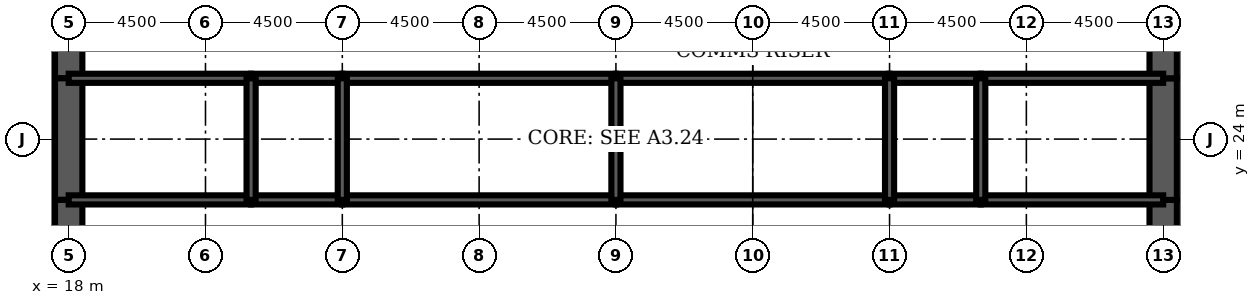
"""IFC4 building model, lengths in metres.
Left out: names, types, materials, properties, quantities, classifications, styles, units other than length and angle.
Written with IfcOpenShell. Run it as: python <this file> out.ifc"""

import sys

from ifc_helpers import new_model, si_unit, direction, frame, frame_2d, origin, place, context, subcontext, project, spatial, rectangle, extrude, element, fill, save


model = new_model("IFC4")
c1 = context("Model", 3, precision=1e-05, world=origin(), true_north=direction((0.0, 1.0)))
c2 = subcontext(c1, "Body", "Model", "MODEL_VIEW")
j1 = project(units=[si_unit("LENGTHUNIT", "METRE"), si_unit("PLANEANGLEUNIT", "RADIAN")], contexts=[c1])
p1 = place(None, origin())
s1 = spatial("IfcSite", under=j1, at=p1, CompositionType="ELEMENT")
p2 = place(p1, origin())
s2 = spatial("IfcBuilding", under=s1, at=p2, CompositionType="ELEMENT")
p3 = place(p2, frame((0.0, 0.0, 104.7)))
s3 = spatial("IfcBuildingStorey", under=s2, at=p3, CompositionType="ELEMENT", Elevation=104.7)
p4 = place(p3, frame((18.0, 28.8, 0.0), z_axis=(0.0, 0.0, 1.0), x_axis=(0.0, -1.0, 0.0)))
e1 = element("IfcWall", 1, at=p4, inside=s3, PredefinedType="SHEAR", context=c2, shape_type="SweptSolid", body=[
    extrude(rectangle(XDim=2.8, YDim=0.9, at=frame_2d((1.4, 0.0))), origin(), (0.0, 0.0, 1.0), 4.2),
])
p5 = place(p4, frame((0.4, 0.0, 0.0)))
e2 = element("IfcOpeningElement", 2, at=p5, cuts=e1, PredefinedType="OPENING", context=c2, shape_type="SweptSolid", body=[
    extrude(rectangle(XDim=1.8, YDim=2.1, at=frame_2d((0.9, 1.05))), frame((0.0, 0.46, 0.0), z_axis=(0.0, -1.0, 0.0), x_axis=(1.0, 0.0, 0.0)), (0.0, 0.0, 1.0), 0.92),
])
p6 = place(p3, frame((18.0, 26.0, 0.0), z_axis=(0.0, 0.0, 1.0), x_axis=(0.0, -1.0, 0.0)))
e3 = element("IfcWall", 3, at=p6, inside=s3, PredefinedType="SHEAR", context=c2, shape_type="SweptSolid", body=[
    extrude(rectangle(XDim=4.0, YDim=0.9, at=frame_2d((2.0, 0.0))), origin(), (0.0, 0.0, 1.0), 4.2),
])
p7 = place(p3, frame((18.0, 22.0, 0.0), z_axis=(0.0, 0.0, 1.0), x_axis=(0.0, -1.0, 0.0)))
e4 = element("IfcWall", 4, at=p7, inside=s3, PredefinedType="SHEAR", context=c2, shape_type="SweptSolid", body=[
    extrude(rectangle(XDim=2.8, YDim=0.9, at=frame_2d((1.4, 0.0))), origin(), (0.0, 0.0, 1.0), 4.2),
])
p8 = place(p7, frame((0.6, 0.0, 0.0)))
e5 = element("IfcOpeningElement", 5, at=p8, cuts=e4, PredefinedType="OPENING", context=c2, shape_type="SweptSolid", body=[
    extrude(rectangle(XDim=1.8, YDim=2.1, at=frame_2d((0.9, 1.05))), frame((0.0, 0.46, 0.0), z_axis=(0.0, -1.0, 0.0), x_axis=(1.0, 0.0, 0.0)), (0.0, 0.0, 1.0), 0.92),
])
p9 = place(p3, frame((54.0, 19.2, 0.0), z_axis=(0.0, 0.0, 1.0), x_axis=(0.0, 1.0, 0.0)))
e6 = element("IfcWall", 6, at=p9, inside=s3, PredefinedType="SHEAR", context=c2, shape_type="SweptSolid", body=[
    extrude(rectangle(XDim=2.8, YDim=0.9, at=frame_2d((1.4, 0.0))), origin(), (0.0, 0.0, 1.0), 4.2),
])
p10 = place(p9, frame((0.4, 0.0, 0.0)))
e7 = element("IfcOpeningElement", 7, at=p10, cuts=e6, PredefinedType="OPENING", context=c2, shape_type="SweptSolid", body=[
    extrude(rectangle(XDim=1.8, YDim=2.1, at=frame_2d((0.9, 1.05))), frame((0.0, 0.46, 0.0), z_axis=(0.0, -1.0, 0.0), x_axis=(1.0, 0.0, 0.0)), (0.0, 0.0, 1.0), 0.92),
])
p11 = place(p3, frame((54.0, 22.0, 0.0), z_axis=(0.0, 0.0, 1.0), x_axis=(0.0, 1.0, 0.0)))
e8 = element("IfcWall", 8, at=p11, inside=s3, PredefinedType="SHEAR", context=c2, shape_type="SweptSolid", body=[
    extrude(rectangle(XDim=4.0, YDim=0.9, at=frame_2d((2.0, 0.0))), origin(), (0.0, 0.0, 1.0), 4.2),
])
p12 = place(p3, frame((54.0, 26.0, 0.0), z_axis=(0.0, 0.0, 1.0), x_axis=(0.0, 1.0, 0.0)))
e9 = element("IfcWall", 9, at=p12, inside=s3, PredefinedType="SHEAR", context=c2, shape_type="SweptSolid", body=[
    extrude(rectangle(XDim=2.8, YDim=0.9, at=frame_2d((1.4, 0.0))), origin(), (0.0, 0.0, 1.0), 4.2),
])
p13 = place(p12, frame((0.6, 0.0, 0.0)))
e10 = element("IfcOpeningElement", 10, at=p13, cuts=e9, PredefinedType="OPENING", context=c2, shape_type="SweptSolid", body=[
    extrude(rectangle(XDim=1.8, YDim=2.1, at=frame_2d((0.9, 1.05))), frame((0.0, 0.46, 0.0), z_axis=(0.0, -1.0, 0.0), x_axis=(1.0, 0.0, 0.0)), (0.0, 0.0, 1.0), 0.92),
])
p14 = place(p3, frame((18.0, 22.0, 0.0), z_axis=(0.0, 0.0, 1.0), x_axis=(1.0, 0.0, 0.0)))
e11 = element("IfcWall", 11, at=p14, inside=s3, PredefinedType="SOLIDWALL", context=c2, shape_type="SweptSolid", body=[
    extrude(rectangle(XDim=6.0, YDim=0.3, at=frame_2d((3.0, 0.0))), origin(), (0.0, 0.0, 1.0), 4.2),
])
p15 = place(p14, frame((4.4, 0.0, 0.0)))
e12 = element("IfcOpeningElement", 12, at=p15, cuts=e11, PredefinedType="OPENING", context=c2, shape_type="SweptSolid", body=[
    extrude(rectangle(XDim=1.0, YDim=2.1, at=frame_2d((0.5, 1.05))), frame((0.0, 0.16, 0.0), z_axis=(0.0, -1.0, 0.0), x_axis=(1.0, 0.0, 0.0)), (0.0, 0.0, 1.0), 0.32),
])
p16 = place(p14, frame((0.7, 0.0, 0.0)))
e13 = element("IfcOpeningElement", 13, at=p16, cuts=e11, PredefinedType="OPENING", context=c2, shape_type="SweptSolid", body=[
    extrude(rectangle(XDim=1.0, YDim=2.1, at=frame_2d((0.5, 1.05))), frame((0.0, 0.16, 0.0), z_axis=(0.0, -1.0, 0.0), x_axis=(1.0, 0.0, 0.0)), (0.0, 0.0, 1.0), 0.32),
])
p17 = place(p3, frame((24.0, 22.0, 0.0), z_axis=(0.0, 0.0, 1.0), x_axis=(1.0, 0.0, 0.0)))
e14 = element("IfcWall", 14, at=p17, inside=s3, PredefinedType="SOLIDWALL", context=c2, shape_type="SweptSolid", body=[
    extrude(rectangle(XDim=3.0, YDim=0.3, at=frame_2d((1.5, 0.0))), origin(), (0.0, 0.0, 1.0), 4.2),
])
p18 = place(p17, frame((1.0, 0.0, 0.0)))
e15 = element("IfcOpeningElement", 15, at=p18, cuts=e14, PredefinedType="OPENING", context=c2, shape_type="SweptSolid", body=[
    extrude(rectangle(XDim=1.0, YDim=2.1, at=frame_2d((0.5, 1.05))), frame((0.0, 0.16, 0.0), z_axis=(0.0, -1.0, 0.0), x_axis=(1.0, 0.0, 0.0)), (0.0, 0.0, 1.0), 0.32),
])
p19 = place(p3, frame((27.0, 22.0, 0.0), z_axis=(0.0, 0.0, 1.0), x_axis=(1.0, 0.0, 0.0)))
e16 = element("IfcWall", 16, at=p19, inside=s3, PredefinedType="SOLIDWALL", context=c2, shape_type="SweptSolid", body=[
    extrude(rectangle(XDim=9.0, YDim=0.3, at=frame_2d((4.5, 0.0))), origin(), (0.0, 0.0, 1.0), 4.2),
])
p20 = place(p19, frame((4.0, 0.0, 0.0)))
e17 = element("IfcOpeningElement", 17, at=p20, cuts=e16, PredefinedType="OPENING", context=c2, shape_type="SweptSolid", body=[
    extrude(rectangle(XDim=1.0, YDim=2.1, at=frame_2d((0.5, 1.05))), frame((0.0, 0.16, 0.0), z_axis=(0.0, -1.0, 0.0), x_axis=(1.0, 0.0, 0.0)), (0.0, 0.0, 1.0), 0.32),
])
p21 = place(p3, frame((36.0, 22.0, 0.0), z_axis=(0.0, 0.0, 1.0), x_axis=(1.0, 0.0, 0.0)))
e18 = element("IfcWall", 18, at=p21, inside=s3, PredefinedType="SOLIDWALL", context=c2, shape_type="SweptSolid", body=[
    extrude(rectangle(XDim=9.0, YDim=0.3, at=frame_2d((4.5, 0.0))), origin(), (0.0, 0.0, 1.0), 4.2),
])
p22 = place(p21, frame((4.0, 0.0, 0.0)))
e19 = element("IfcOpeningElement", 19, at=p22, cuts=e18, PredefinedType="OPENING", context=c2, shape_type="SweptSolid", body=[
    extrude(rectangle(XDim=1.0, YDim=2.1, at=frame_2d((0.5, 1.05))), frame((0.0, 0.16, 0.0), z_axis=(0.0, -1.0, 0.0), x_axis=(1.0, 0.0, 0.0)), (0.0, 0.0, 1.0), 0.32),
])
p23 = place(p3, frame((45.0, 22.0, 0.0), z_axis=(0.0, 0.0, 1.0), x_axis=(1.0, 0.0, 0.0)))
e20 = element("IfcWall", 20, at=p23, inside=s3, PredefinedType="SOLIDWALL", context=c2, shape_type="SweptSolid", body=[
    extrude(rectangle(XDim=3.0, YDim=0.3, at=frame_2d((1.5, 0.0))), origin(), (0.0, 0.0, 1.0), 4.2),
])
p24 = place(p23, frame((1.0, 0.0, 0.0)))
e21 = element("IfcOpeningElement", 21, at=p24, cuts=e20, PredefinedType="OPENING", context=c2, shape_type="SweptSolid", body=[
    extrude(rectangle(XDim=1.0, YDim=2.1, at=frame_2d((0.5, 1.05))), frame((0.0, 0.16, 0.0), z_axis=(0.0, -1.0, 0.0), x_axis=(1.0, 0.0, 0.0)), (0.0, 0.0, 1.0), 0.32),
])
p25 = place(p3, frame((48.0, 22.0, 0.0), z_axis=(0.0, 0.0, 1.0), x_axis=(1.0, 0.0, 0.0)))
e22 = element("IfcWall", 22, at=p25, inside=s3, PredefinedType="SOLIDWALL", context=c2, shape_type="SweptSolid", body=[
    extrude(rectangle(XDim=6.0, YDim=0.3, at=frame_2d((3.0, 0.0))), origin(), (0.0, 0.0, 1.0), 4.2),
])
p26 = place(p25, frame((2.0, 0.0, 0.0)))
e23 = element("IfcOpeningElement", 23, at=p26, cuts=e22, PredefinedType="OPENING", context=c2, shape_type="SweptSolid", body=[
    extrude(rectangle(XDim=1.0, YDim=2.1, at=frame_2d((0.5, 1.05))), frame((0.0, 0.16, 0.0), z_axis=(0.0, -1.0, 0.0), x_axis=(1.0, 0.0, 0.0)), (0.0, 0.0, 1.0), 0.32),
])
p27 = place(p25, frame((4.3, 0.0, 0.0)))
e24 = element("IfcOpeningElement", 24, at=p27, cuts=e22, PredefinedType="OPENING", context=c2, shape_type="SweptSolid", body=[
    extrude(rectangle(XDim=1.0, YDim=2.1, at=frame_2d((0.5, 1.05))), frame((0.0, 0.16, 0.0), z_axis=(0.0, -1.0, 0.0), x_axis=(1.0, 0.0, 0.0)), (0.0, 0.0, 1.0), 0.32),
])
p28 = place(p3, frame((18.0, 26.0, 0.0), z_axis=(0.0, 0.0, 1.0), x_axis=(1.0, 0.0, 0.0)))
e25 = element("IfcWall", 25, at=p28, inside=s3, PredefinedType="SOLIDWALL", context=c2, shape_type="SweptSolid", body=[
    extrude(rectangle(XDim=6.0, YDim=0.3, at=frame_2d((3.0, 0.0))), origin(), (0.0, 0.0, 1.0), 4.2),
])
p29 = place(p3, frame((24.0, 26.0, 0.0), z_axis=(0.0, 0.0, 1.0), x_axis=(1.0, 0.0, 0.0)))
e26 = element("IfcWall", 26, at=p29, inside=s3, PredefinedType="SOLIDWALL", context=c2, shape_type="SweptSolid", body=[
    extrude(rectangle(XDim=3.0, YDim=0.3, at=frame_2d((1.5, 0.0))), origin(), (0.0, 0.0, 1.0), 4.2),
])
for number, where, z_axis, x_axis in (
    (27, (27.0, 26.0, 0.0), (0.0, 0.0, 1.0), (1.0, 0.0, 0.0)),
    (28, (36.0, 26.0, 0.0), (0.0, 0.0, 1.0), (1.0, 0.0, 0.0)),
):
    element("IfcWall", number, at=place(p3, frame(where, z_axis=z_axis, x_axis=x_axis)), inside=s3, PredefinedType="SOLIDWALL", context=c2, shape_type="SweptSolid", body=[
        extrude(rectangle(XDim=9.0, YDim=0.3, at=frame_2d((4.5, 0.0))), origin(), (0.0, 0.0, 1.0), 4.2),
    ])
p30 = place(p3, frame((45.0, 26.0, 0.0), z_axis=(0.0, 0.0, 1.0), x_axis=(1.0, 0.0, 0.0)))
e29 = element("IfcWall", 29, at=p30, inside=s3, PredefinedType="SOLIDWALL", context=c2, shape_type="SweptSolid", body=[
    extrude(rectangle(XDim=3.0, YDim=0.3, at=frame_2d((1.5, 0.0))), origin(), (0.0, 0.0, 1.0), 4.2),
])
p31 = place(p3, frame((48.0, 26.0, 0.0), z_axis=(0.0, 0.0, 1.0), x_axis=(1.0, 0.0, 0.0)))
e30 = element("IfcWall", 30, at=p31, inside=s3, PredefinedType="SOLIDWALL", context=c2, shape_type="SweptSolid", body=[
    extrude(rectangle(XDim=6.0, YDim=0.3, at=frame_2d((3.0, 0.0))), origin(), (0.0, 0.0, 1.0), 4.2),
])
for number, where, z_axis, x_axis in (
    (31, (24.0, 22.0, 0.0), (0.0, 0.0, 1.0), (0.0, 1.0, 0.0)),
    (32, (27.0, 22.0, 0.0), (0.0, 0.0, 1.0), (0.0, 1.0, 0.0)),
    (33, (36.0, 22.0, 0.0), (0.0, 0.0, 1.0), (0.0, 1.0, 0.0)),
    (34, (45.0, 22.0, 0.0), (0.0, 0.0, 1.0), (0.0, 1.0, 0.0)),
    (35, (48.0, 22.0, 0.0), (0.0, 0.0, 1.0), (0.0, 1.0, 0.0)),
):
    element("IfcWall", number, at=place(p3, frame(where, z_axis=z_axis, x_axis=x_axis)), inside=s3, PredefinedType="SOLIDWALL", context=c2, shape_type="SweptSolid", body=[
        extrude(rectangle(XDim=4.0, YDim=0.3, at=frame_2d((2.0, 0.0))), origin(), (0.0, 0.0, 1.0), 4.2),
    ])
p32 = place(p3, frame((38.0, 22.15, 0.0), z_axis=(0.0, 0.0, 1.0), x_axis=(0.0, 1.0, 0.0)))
e36 = element("IfcWall", 36, at=p32, inside=s3, PredefinedType="PARTITIONING", context=c2, shape_type="SweptSolid", body=[
    extrude(rectangle(XDim=3.7, YDim=0.15, at=frame_2d((1.85, 0.0))), origin(), (0.0, 0.0, 1.0), 3.0),
])
p33 = place(p32, frame((2.2, 0.0, 0.0)))
e37 = element("IfcOpeningElement", 37, at=p33, cuts=e36, PredefinedType="OPENING", context=c2, shape_type="SweptSolid", body=[
    extrude(rectangle(XDim=1.0, YDim=2.1, at=frame_2d((0.5, 1.05))), frame((0.0, 0.085, 0.0), z_axis=(0.0, -1.0, 0.0), x_axis=(1.0, 0.0, 0.0)), (0.0, 0.0, 1.0), 0.17),
])
for number, where, z_axis, x_axis in (
    (38, (20.025, 22.15, 0.0), (0.0, 0.0, 1.0), (0.0, 1.0, 0.0)),
    (39, (51.975, 22.15, 0.0), (0.0, 0.0, 1.0), (0.0, 1.0, 0.0)),
):
    element("IfcWall", number, at=place(p3, frame(where, z_axis=z_axis, x_axis=x_axis)), inside=s3, PredefinedType="PARTITIONING", context=c2, shape_type="SweptSolid", body=[
        extrude(rectangle(XDim=3.7, YDim=0.15, at=frame_2d((1.85, 0.0))), origin(), (0.0, 0.0, 1.0), 3.0),
    ])
p34 = place(p33, origin())
e40 = element("IfcDoor", 40, at=p34, inside=s3, OperationType="SINGLE_SWING_RIGHT", PredefinedType="DOOR", context=c2, shape_type="SweptSolid", body=[
    extrude(rectangle(XDim=1.0, YDim=2.1, at=frame_2d((0.5, 1.05))), frame((0.0, 0.025, 0.0), z_axis=(0.0, -1.0, 0.0), x_axis=(1.0, 0.0, 0.0)), (0.0, 0.0, 1.0), 0.05),
])
fill(e37, e40)
p35 = place(p8, origin())
e41 = element("IfcDoor", 41, at=p35, inside=s3, OperationType="SINGLE_SWING_LEFT", PredefinedType="DOOR", context=c2, shape_type="SweptSolid", body=[
    extrude(rectangle(XDim=1.8, YDim=2.1, at=frame_2d((0.9, 1.05))), frame((0.0, 0.45, 0.0), z_axis=(0.0, -1.0, 0.0), x_axis=(1.0, 0.0, 0.0)), (0.0, 0.0, 1.0), 0.899),
])
fill(e5, e41)
p36 = place(p5, origin())
e42 = element("IfcDoor", 42, at=p36, inside=s3, OperationType="SINGLE_SWING_LEFT", PredefinedType="DOOR", context=c2, shape_type="SweptSolid", body=[
    extrude(rectangle(XDim=1.8, YDim=2.1, at=frame_2d((0.9, 1.05))), frame((0.0, 0.45, 0.0), z_axis=(0.0, -1.0, 0.0), x_axis=(1.0, 0.0, 0.0)), (0.0, 0.0, 1.0), 0.899),
])
fill(e2, e42)
p37 = place(p10, origin())
e43 = element("IfcDoor", 43, at=p37, inside=s3, OperationType="SINGLE_SWING_LEFT", PredefinedType="DOOR", context=c2, shape_type="SweptSolid", body=[
    extrude(rectangle(XDim=1.8, YDim=2.1, at=frame_2d((0.9, 1.05))), frame((0.0, 0.45, 0.0), z_axis=(0.0, -1.0, 0.0), x_axis=(1.0, 0.0, 0.0)), (0.0, 0.0, 1.0), 0.899),
])
fill(e7, e43)
p38 = place(p13, origin())
e44 = element("IfcDoor", 44, at=p38, inside=s3, OperationType="SINGLE_SWING_LEFT", PredefinedType="DOOR", context=c2, shape_type="SweptSolid", body=[
    extrude(rectangle(XDim=1.8, YDim=2.1, at=frame_2d((0.9, 1.05))), frame((0.0, 0.45, 0.0), z_axis=(0.0, -1.0, 0.0), x_axis=(1.0, 0.0, 0.0)), (0.0, 0.0, 1.0), 0.899),
])
fill(e10, e44)
p39 = place(p15, origin())
e45 = element("IfcDoor", 45, at=p39, inside=s3, OperationType="SINGLE_SWING_RIGHT", PredefinedType="DOOR", context=c2, shape_type="SweptSolid", body=[
    extrude(rectangle(XDim=1.0, YDim=2.1, at=frame_2d((0.5, 1.05))), frame((0.0, 0.025, 0.0), z_axis=(0.0, -1.0, 0.0), x_axis=(1.0, 0.0, 0.0)), (0.0, 0.0, 1.0), 0.05),
])
fill(e12, e45)
p40 = place(p18, origin())
e46 = element("IfcDoor", 46, at=p40, inside=s3, OperationType="SINGLE_SWING_LEFT", PredefinedType="DOOR", context=c2, shape_type="SweptSolid", body=[
    extrude(rectangle(XDim=1.0, YDim=2.1, at=frame_2d((0.5, 1.05))), frame((0.0, 0.025, 0.0), z_axis=(0.0, -1.0, 0.0), x_axis=(1.0, 0.0, 0.0)), (0.0, 0.0, 1.0), 0.05),
])
fill(e15, e46)
p41 = place(p20, origin())
e47 = element("IfcDoor", 47, at=p41, inside=s3, OperationType="SINGLE_SWING_LEFT", PredefinedType="DOOR", context=c2, shape_type="SweptSolid", body=[
    extrude(rectangle(XDim=1.0, YDim=2.1, at=frame_2d((0.5, 1.05))), frame((0.0, 0.025, 0.0), z_axis=(0.0, -1.0, 0.0), x_axis=(1.0, 0.0, 0.0)), (0.0, 0.0, 1.0), 0.05),
])
fill(e17, e47)
p42 = place(p22, origin())
e48 = element("IfcDoor", 48, at=p42, inside=s3, OperationType="SINGLE_SWING_LEFT", PredefinedType="DOOR", context=c2, shape_type="SweptSolid", body=[
    extrude(rectangle(XDim=1.0, YDim=2.1, at=frame_2d((0.5, 1.05))), frame((0.0, 0.025, 0.0), z_axis=(0.0, -1.0, 0.0), x_axis=(1.0, 0.0, 0.0)), (0.0, 0.0, 1.0), 0.05),
])
fill(e19, e48)
p43 = place(p24, origin())
e49 = element("IfcDoor", 49, at=p43, inside=s3, OperationType="SINGLE_SWING_LEFT", PredefinedType="DOOR", context=c2, shape_type="SweptSolid", body=[
    extrude(rectangle(XDim=1.0, YDim=2.1, at=frame_2d((0.5, 1.05))), frame((0.0, 0.025, 0.0), z_axis=(0.0, -1.0, 0.0), x_axis=(1.0, 0.0, 0.0)), (0.0, 0.0, 1.0), 0.05),
])
fill(e21, e49)
p44 = place(p26, origin())
e50 = element("IfcDoor", 50, at=p44, inside=s3, OperationType="SINGLE_SWING_LEFT", PredefinedType="DOOR", context=c2, shape_type="SweptSolid", body=[
    extrude(rectangle(XDim=1.0, YDim=2.1, at=frame_2d((0.5, 1.05))), frame((0.0, 0.025, 0.0), z_axis=(0.0, -1.0, 0.0), x_axis=(1.0, 0.0, 0.0)), (0.0, 0.0, 1.0), 0.05),
])
fill(e23, e50)
p45 = place(p16, origin())
e51 = element("IfcDoor", 51, at=p45, inside=s3, OperationType="SINGLE_SWING_LEFT", PredefinedType="DOOR", context=c2, shape_type="SweptSolid", body=[
    extrude(rectangle(XDim=1.0, YDim=2.1, at=frame_2d((0.5, 1.05))), frame((0.0, 0.025, 0.0), z_axis=(0.0, -1.0, 0.0), x_axis=(1.0, 0.0, 0.0)), (0.0, 0.0, 1.0), 0.05),
])
fill(e13, e51)
p46 = place(p27, origin())
e52 = element("IfcDoor", 52, at=p46, inside=s3, OperationType="SINGLE_SWING_RIGHT", PredefinedType="DOOR", context=c2, shape_type="SweptSolid", body=[
    extrude(rectangle(XDim=1.0, YDim=2.1, at=frame_2d((0.5, 1.05))), frame((0.0, 0.025, 0.0), z_axis=(0.0, -1.0, 0.0), x_axis=(1.0, 0.0, 0.0)), (0.0, 0.0, 1.0), 0.05),
])
fill(e24, e52)
save(model, sys.argv[1])
